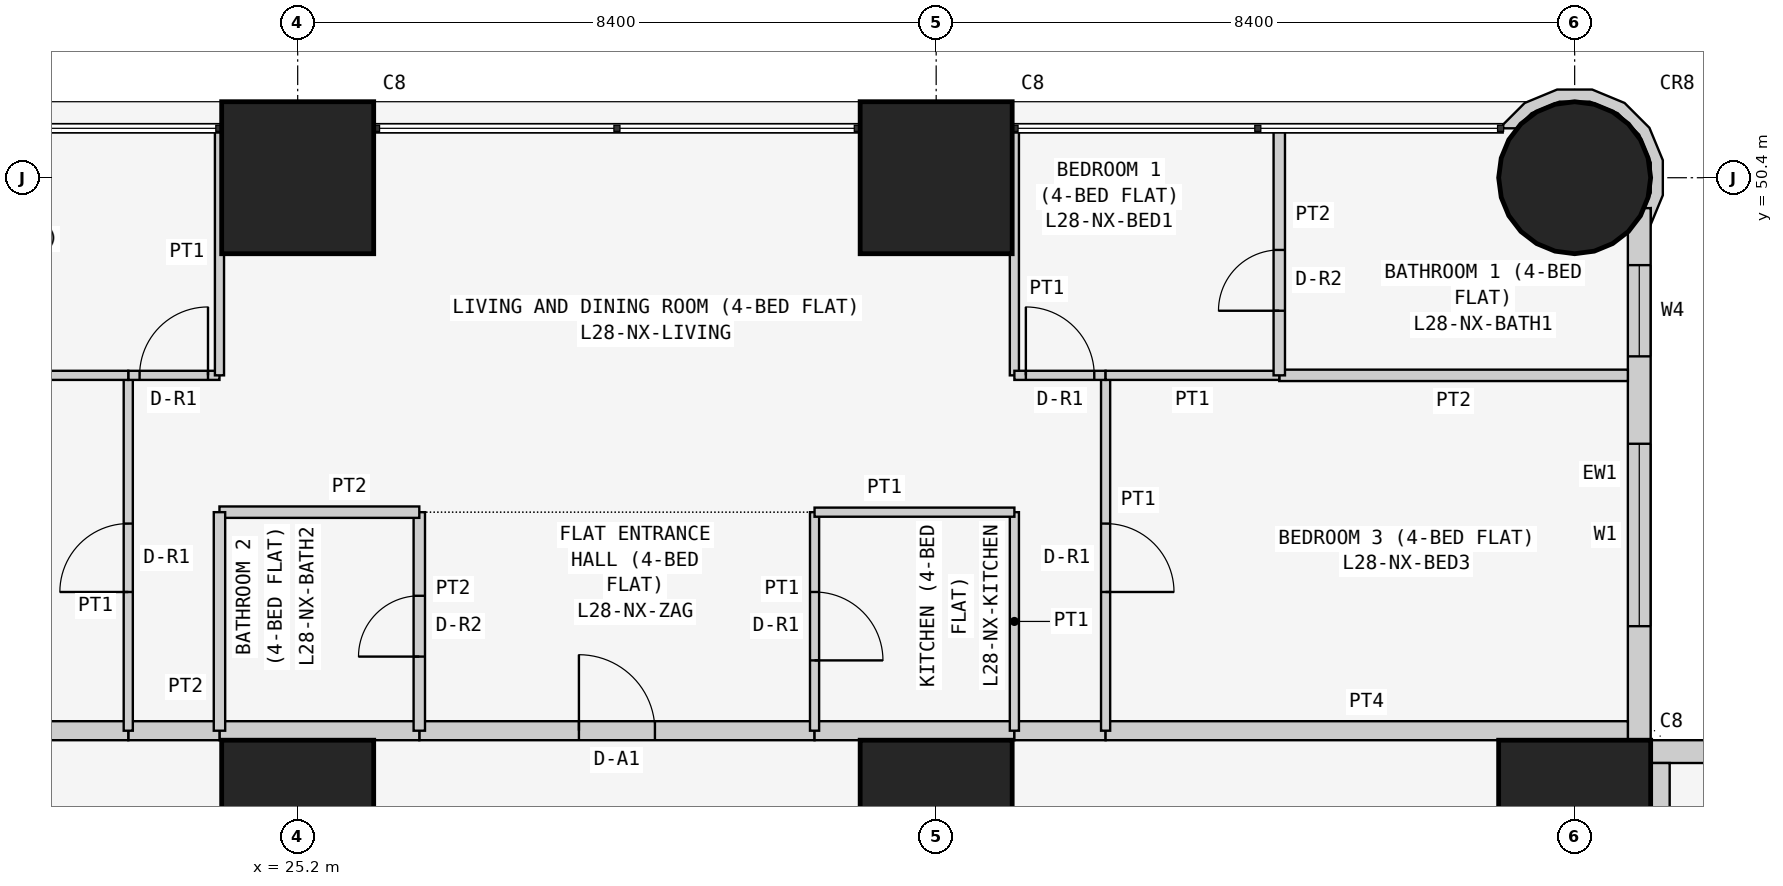
"""IFC4 building model, lengths in metres.
Left out: names, types, materials, properties, quantities, classifications, styles, units other than length and angle.
Written with IfcOpenShell. Run it as: python <this file> out.ifc"""

import sys

from ifc_helpers import new_model, si_unit, direction, frame, frame_2d, origin, origin_2d, place, context, subcontext, project, spatial, polyline, rectangle, circle, outline, extrude, element, fill, save


model = new_model("IFC4")
c1 = context("Model", 3, precision=1e-05, world=origin(), true_north=direction((0.0, 1.0)))
c2 = subcontext(c1, "Body", "Model", "MODEL_VIEW")
j1 = project(units=[si_unit("LENGTHUNIT", "METRE"), si_unit("PLANEANGLEUNIT", "RADIAN")], contexts=[c1])
p1 = place(None, origin())
s1 = spatial("IfcSite", under=j1, at=p1, CompositionType="ELEMENT")
p2 = place(p1, origin())
s2 = spatial("IfcBuilding", under=s1, at=p2, CompositionType="ELEMENT")
p3 = place(p2, frame((0.0, 0.0, 112.5)))
s3 = spatial("IfcBuildingStorey", under=s2, at=p3, CompositionType="ELEMENT", Elevation=112.5)
for number, where, z_axis, x_axis in (
    (1, (25.2, 42.0, 0.0), (0.0, 0.0, 1.0), (1.0, 0.0, 0.0)),
    (2, (25.2, 50.4, 0.0), (0.0, 0.0, 1.0), (1.0, 0.0, 0.0)),
    (3, (33.6, 42.0, 0.0), (0.0, 0.0, 1.0), (1.0, 0.0, 0.0)),
    (4, (33.6, 50.4, 0.0), (0.0, 0.0, 1.0), (1.0, 0.0, 0.0)),
    (5, (42.0, 42.0, 0.0), (0.0, 0.0, 1.0), (1.0, 0.0, 0.0)),
):
    element("IfcColumn", number, at=place(p3, frame(where, z_axis=z_axis, x_axis=x_axis)), inside=s3, PredefinedType="COLUMN", context=c2, shape_type="SweptSolid", body=[
        extrude(rectangle(XDim=2.0, YDim=2.0, at=origin_2d()), origin(), (0.0, 0.0, 1.0), 3.6),
    ])
p4 = place(p3, frame((42.0, 50.4, 0.0), z_axis=(0.0, 0.0, 1.0), x_axis=(1.0, 0.0, 0.0)))
e6 = element("IfcColumn", 6, at=p4, inside=s3, PredefinedType="COLUMN", context=c2, shape_type="SweptSolid", body=[
    extrude(circle(Radius=1.0, at=origin_2d()), origin(), (0.0, 0.0, 1.0), 3.6),
])
p5 = place(p3, frame((58.4, 42.85, 0.0), z_axis=(0.0, 0.0, 1.0), x_axis=(-1.0, 0.0, 0.0)))
e7 = element("IfcWall", 7, at=p5, inside=s3, PredefinedType="SOLIDWALL", context=c2, shape_type="SweptSolid", body=[
    extrude(rectangle(XDim=15.7, YDim=0.3, at=frame_2d((7.85, 0.0))), origin(), (0.0, 0.0, 1.0), 3.45),
])
p6 = place(p5, frame((12.4, 0.0, 0.9)))
e8 = element("IfcOpeningElement", 8, at=p6, cuts=e7, PredefinedType="OPENING", context=c2, shape_type="SweptSolid", body=[
    extrude(rectangle(XDim=1.8, YDim=1.5, at=frame_2d((0.9, 0.75))), frame((0.0, 0.16, 0.0), z_axis=(0.0, -1.0, 0.0), x_axis=(1.0, 0.0, 0.0)), (0.0, 0.0, 1.0), 0.32),
])
p7 = place(p5, frame((9.55, 0.0, 1.5)))
e9 = element("IfcOpeningElement", 9, at=p7, cuts=e7, PredefinedType="OPENING", context=c2, shape_type="SweptSolid", body=[
    extrude(rectangle(XDim=0.9, YDim=0.7, at=frame_2d((0.45, 0.35))), frame((0.0, 0.16, 0.0), z_axis=(0.0, -1.0, 0.0), x_axis=(1.0, 0.0, 0.0)), (0.0, 0.0, 1.0), 0.32),
])
p8 = place(p5, frame((5.1, 0.0, 0.9)))
e10 = element("IfcOpeningElement", 10, at=p8, cuts=e7, PredefinedType="OPENING", context=c2, shape_type="SweptSolid", body=[
    extrude(rectangle(XDim=1.8, YDim=1.5, at=frame_2d((0.9, 0.75))), frame((0.0, 0.16, 0.0), z_axis=(0.0, -1.0, 0.0), x_axis=(1.0, 0.0, 0.0)), (0.0, 0.0, 1.0), 0.32),
])
p9 = place(p5, frame((2.0, 0.0, 0.0)))
e11 = element("IfcOpeningElement", 11, at=p9, cuts=e7, PredefinedType="OPENING", context=c2, shape_type="SweptSolid", body=[
    extrude(rectangle(XDim=0.9, YDim=2.4, at=frame_2d((0.45, 1.2))), frame((0.0, 0.16, 0.0), z_axis=(0.0, -1.0, 0.0), x_axis=(1.0, 0.0, 0.0)), (0.0, 0.0, 1.0), 0.32),
])
p10 = place(p5, frame((0.7, 0.0, 0.9)))
e12 = element("IfcOpeningElement", 12, at=p10, cuts=e7, PredefinedType="OPENING", context=c2, shape_type="SweptSolid", body=[
    extrude(rectangle(XDim=1.2, YDim=1.5, at=frame_2d((0.6, 0.75))), frame((0.0, 0.16, 0.0), z_axis=(0.0, -1.0, 0.0), x_axis=(1.0, 0.0, 0.0)), (0.0, 0.0, 1.0), 0.32),
])
p11 = place(p3, frame((42.85, 43.0, 0.0), z_axis=(0.0, 0.0, 1.0), x_axis=(0.0, 1.0, 0.0)))
e13 = element("IfcWall", 13, at=p11, inside=s3, PredefinedType="SOLIDWALL", context=c2, shape_type="SweptSolid", body=[
    extrude(rectangle(XDim=7.0, YDim=0.3, at=frame_2d((3.5, 0.0))), origin(), (0.0, 0.0, 1.0), 3.45),
])
p12 = place(p11, frame((1.5, 0.0, 0.9)))
e14 = element("IfcOpeningElement", 14, at=p12, cuts=e13, PredefinedType="OPENING", context=c2, shape_type="SweptSolid", body=[
    extrude(rectangle(XDim=2.4, YDim=1.5, at=frame_2d((1.2, 0.75))), frame((0.0, 0.16, 0.0), z_axis=(0.0, -1.0, 0.0), x_axis=(1.0, 0.0, 0.0)), (0.0, 0.0, 1.0), 0.32),
])
p13 = place(p11, frame((5.05, 0.0, 0.9)))
e15 = element("IfcOpeningElement", 15, at=p13, cuts=e13, PredefinedType="OPENING", context=c2, shape_type="SweptSolid", body=[
    extrude(rectangle(XDim=1.2, YDim=1.5, at=frame_2d((0.6, 0.75))), frame((0.0, 0.16, 0.0), z_axis=(0.0, -1.0, 0.0), x_axis=(1.0, 0.0, 0.0)), (0.0, 0.0, 1.0), 0.32),
])
p14 = place(p3, frame((42.919, 49.833, 0.0), z_axis=(0.0, 0.0, 1.0), x_axis=(0.555974394895, 0.831199417842, 0.0)))
e16 = element("IfcWall", 16, at=p14, inside=s3, PredefinedType="SOLIDWALL", context=c2, shape_type="SweptSolid", body=[
    extrude(outline(polyline([(0.413, -0.013), (0.797, 0.243), (1.053, 0.627), (1.143, 1.08), (1.053, 1.532), (0.796, 1.916), (0.412, 2.172), (0.017, 2.25), (-0.023, 2.224), (0.075, 2.077), (0.35, 2.022), (0.682, 1.801), (0.903, 1.47), (0.981, 1.08), (0.904, 0.689), (0.682, 0.358), (0.351, 0.137), (0.126, 0.092), (0.184, 0.026), (0.003, -0.095), (0.413, -0.013)])), origin(), (0.0, 0.0, 1.0), 3.45),
])
p15 = place(p3, frame((26.8, 43.125, 0.0), z_axis=(0.0, 0.0, 1.0), x_axis=(1.0, 0.0, 0.0)))
e17 = element("IfcWall", 17, at=p15, inside=s3, PredefinedType="PARTITIONING", context=c2, shape_type="SweptSolid", body=[
    extrude(rectangle(XDim=5.2, YDim=0.25, at=frame_2d((2.6, 0.0))), origin(), (0.0, 0.0, 1.0), 3.45),
])
p16 = place(p15, frame((2.1, 0.0, 0.0)))
e18 = element("IfcOpeningElement", 18, at=p16, cuts=e17, PredefinedType="OPENING", context=c2, shape_type="SweptSolid", body=[
    extrude(rectangle(XDim=1.0, YDim=2.1, at=frame_2d((0.5, 1.05))), frame((0.0, 0.135, 0.0), z_axis=(0.0, -1.0, 0.0), x_axis=(1.0, 0.0, 0.0)), (0.0, 0.0, 1.0), 0.27),
])
p17 = place(p3, frame((24.171, 43.125, 0.0), z_axis=(0.0, 0.0, 1.0), x_axis=(1.0, 0.0, 0.0)))
e19 = element("IfcWall", 19, at=p17, inside=s3, PredefinedType="PARTITIONING", context=c2, shape_type="SweptSolid", body=[
    extrude(rectangle(XDim=2.629, YDim=0.25, at=frame_2d((1.314, 0.0))), origin(), (0.0, 0.0, 1.0), 3.45),
])
p18 = place(p3, frame((32.0, 43.125, 0.0), z_axis=(0.0, 0.0, 1.0), x_axis=(1.0, 0.0, 0.0)))
e20 = element("IfcWall", 20, at=p18, inside=s3, PredefinedType="PARTITIONING", context=c2, shape_type="SweptSolid", body=[
    extrude(rectangle(XDim=2.629, YDim=0.25, at=frame_2d((1.314, 0.0))), origin(), (0.0, 0.0, 1.0), 3.45),
])
p19 = place(p3, frame((22.971, 43.125, 0.0), z_axis=(0.0, 0.0, 1.0), x_axis=(1.0, 0.0, 0.0)))
e21 = element("IfcWall", 21, at=p19, inside=s3, PredefinedType="PARTITIONING", context=c2, shape_type="SweptSolid", body=[
    extrude(rectangle(XDim=1.2, YDim=0.25, at=frame_2d((0.6, 0.0))), origin(), (0.0, 0.0, 1.0), 3.45),
])
p20 = place(p3, frame((34.629, 43.125, 0.0), z_axis=(0.0, 0.0, 1.0), x_axis=(1.0, 0.0, 0.0)))
e22 = element("IfcWall", 22, at=p20, inside=s3, PredefinedType="PARTITIONING", context=c2, shape_type="SweptSolid", body=[
    extrude(rectangle(XDim=1.2, YDim=0.25, at=frame_2d((0.6, 0.0))), origin(), (0.0, 0.0, 1.0), 3.45),
])
for number, where, z_axis, x_axis in (
    (23, (16.1, 43.125, 0.0), (0.0, 0.0, 1.0), (1.0, 0.0, 0.0)),
    (24, (35.829, 43.125, 0.0), (0.0, 0.0, 1.0), (1.0, 0.0, 0.0)),
    (25, (43.125, 42.7, 0.0), (0.0, 0.0, 1.0), (0.0, -1.0, 0.0)),
):
    element("IfcWall", number, at=place(p3, frame(where, z_axis=z_axis, x_axis=x_axis)), inside=s3, PredefinedType="PARTITIONING", context=c2, shape_type="SweptSolid", body=[
        extrude(rectangle(XDim=6.871, YDim=0.25, at=frame_2d((3.436, 0.0))), origin(), (0.0, 0.0, 1.0), 3.45),
    ])
p21 = place(p3, frame((26.8, 46.0, 0.0), z_axis=(0.0, 0.0, 1.0), x_axis=(0.0, -1.0, 0.0)))
e26 = element("IfcWall", 26, at=p21, inside=s3, PredefinedType="PARTITIONING", context=c2, shape_type="SweptSolid", body=[
    extrude(rectangle(XDim=2.875, YDim=0.15, at=frame_2d((1.438, 0.0))), origin(), (0.0, 0.0, 1.0), 3.45),
])
p22 = place(p21, frame((1.1, 0.0, 0.0)))
e27 = element("IfcOpeningElement", 27, at=p22, cuts=e26, PredefinedType="OPENING", context=c2, shape_type="SweptSolid", body=[
    extrude(rectangle(XDim=0.8, YDim=2.1, at=frame_2d((0.4, 1.05))), frame((0.0, 0.085, 0.0), z_axis=(0.0, -1.0, 0.0), x_axis=(1.0, 0.0, 0.0)), (0.0, 0.0, 1.0), 0.17),
])
p23 = place(p3, frame((32.0, 43.125, 0.0), z_axis=(0.0, 0.0, 1.0), x_axis=(0.0, 1.0, 0.0)))
e28 = element("IfcWall", 28, at=p23, inside=s3, PredefinedType="PARTITIONING", context=c2, shape_type="SweptSolid", body=[
    extrude(rectangle(XDim=2.875, YDim=0.12, at=frame_2d((1.438, 0.0))), origin(), (0.0, 0.0, 1.0), 3.45),
])
p24 = place(p23, frame((0.925, 0.0, 0.0)))
e29 = element("IfcOpeningElement", 29, at=p24, cuts=e28, PredefinedType="OPENING", context=c2, shape_type="SweptSolid", body=[
    extrude(rectangle(XDim=0.9, YDim=2.1, at=frame_2d((0.45, 1.05))), frame((0.0, 0.07, 0.0), z_axis=(0.0, -1.0, 0.0), x_axis=(1.0, 0.0, 0.0)), (0.0, 0.0, 1.0), 0.14),
])
p25 = place(p3, frame((26.8, 46.0, 0.0), z_axis=(0.0, 0.0, 1.0), x_axis=(-1.0, 0.0, 0.0)))
e30 = element("IfcWall", 30, at=p25, inside=s3, PredefinedType="PARTITIONING", context=c2, shape_type="SweptSolid", body=[
    extrude(rectangle(XDim=2.629, YDim=0.15, at=frame_2d((1.314, 0.0))), origin(), (0.0, 0.0, 1.0), 3.45),
])
p26 = place(p3, frame((24.171, 46.0, 0.0), z_axis=(0.0, 0.0, 1.0), x_axis=(0.0, -1.0, 0.0)))
e31 = element("IfcWall", 31, at=p26, inside=s3, PredefinedType="PARTITIONING", context=c2, shape_type="SweptSolid", body=[
    extrude(rectangle(XDim=2.875, YDim=0.15, at=frame_2d((1.438, 0.0))), origin(), (0.0, 0.0, 1.0), 3.45),
])
p27 = place(p3, frame((34.629, 43.125, 0.0), z_axis=(0.0, 0.0, 1.0), x_axis=(0.0, 1.0, 0.0)))
e32 = element("IfcWall", 32, at=p27, inside=s3, PredefinedType="PARTITIONING", context=c2, shape_type="SweptSolid", body=[
    extrude(rectangle(XDim=2.875, YDim=0.12, at=frame_2d((1.438, 0.0))), origin(), (0.0, 0.0, 1.0), 3.45),
])
p28 = place(p3, frame((34.629, 46.0, 0.0), z_axis=(0.0, 0.0, 1.0), x_axis=(-1.0, 0.0, 0.0)))
e33 = element("IfcWall", 33, at=p28, inside=s3, PredefinedType="PARTITIONING", context=c2, shape_type="SweptSolid", body=[
    extrude(rectangle(XDim=2.629, YDim=0.12, at=frame_2d((1.314, 0.0))), origin(), (0.0, 0.0, 1.0), 3.45),
])
p29 = place(p3, frame((22.971, 43.125, 0.0), z_axis=(0.0, 0.0, 1.0), x_axis=(0.0, 1.0, 0.0)))
e34 = element("IfcWall", 34, at=p29, inside=s3, PredefinedType="PARTITIONING", context=c2, shape_type="SweptSolid", body=[
    extrude(rectangle(XDim=4.675, YDim=0.12, at=frame_2d((2.337, 0.0))), origin(), (0.0, 0.0, 1.0), 3.45),
])
p30 = place(p29, frame((1.825, 0.0, 0.0)))
e35 = element("IfcOpeningElement", 35, at=p30, cuts=e34, PredefinedType="OPENING", context=c2, shape_type="SweptSolid", body=[
    extrude(rectangle(XDim=0.9, YDim=2.1, at=frame_2d((0.45, 1.05))), frame((0.0, 0.07, 0.0), z_axis=(0.0, -1.0, 0.0), x_axis=(1.0, 0.0, 0.0)), (0.0, 0.0, 1.0), 0.14),
])
p31 = place(p3, frame((22.971, 47.8, 0.0), z_axis=(0.0, 0.0, 1.0), x_axis=(1.0, 0.0, 0.0)))
e36 = element("IfcWall", 36, at=p31, inside=s3, PredefinedType="PARTITIONING", context=c2, shape_type="SweptSolid", body=[
    extrude(rectangle(XDim=1.2, YDim=0.12, at=frame_2d((0.6, 0.0))), origin(), (0.0, 0.0, 1.0), 3.45),
])
p32 = place(p31, frame((0.149, 0.0, 0.0)))
e37 = element("IfcOpeningElement", 37, at=p32, cuts=e36, PredefinedType="OPENING", context=c2, shape_type="SweptSolid", body=[
    extrude(rectangle(XDim=0.9, YDim=2.1, at=frame_2d((0.45, 1.05))), frame((0.0, 0.07, 0.0), z_axis=(0.0, -1.0, 0.0), x_axis=(1.0, 0.0, 0.0)), (0.0, 0.0, 1.0), 0.14),
])
p33 = place(p3, frame((24.171, 47.8, 0.0), z_axis=(0.0, 0.0, 1.0), x_axis=(0.0, 1.0, 0.0)))
e38 = element("IfcWall", 38, at=p33, inside=s3, PredefinedType="PARTITIONING", context=c2, shape_type="SweptSolid", body=[
    extrude(rectangle(XDim=3.25, YDim=0.12, at=frame_2d((1.625, 0.0))), origin(), (0.0, 0.0, 1.0), 3.45),
])
p34 = place(p3, frame((35.829, 47.8, 0.0), z_axis=(0.0, 0.0, 1.0), x_axis=(0.0, -1.0, 0.0)))
e39 = element("IfcWall", 39, at=p34, inside=s3, PredefinedType="PARTITIONING", context=c2, shape_type="SweptSolid", body=[
    extrude(rectangle(XDim=4.675, YDim=0.12, at=frame_2d((2.337, 0.0))), origin(), (0.0, 0.0, 1.0), 3.45),
])
p35 = place(p34, frame((1.95, 0.0, 0.0)))
e40 = element("IfcOpeningElement", 40, at=p35, cuts=e39, PredefinedType="OPENING", context=c2, shape_type="SweptSolid", body=[
    extrude(rectangle(XDim=0.9, YDim=2.1, at=frame_2d((0.45, 1.05))), frame((0.0, 0.07, 0.0), z_axis=(0.0, -1.0, 0.0), x_axis=(1.0, 0.0, 0.0)), (0.0, 0.0, 1.0), 0.14),
])
p36 = place(p3, frame((34.629, 51.05, 0.0), z_axis=(0.0, 0.0, 1.0), x_axis=(0.0, -1.0, 0.0)))
e41 = element("IfcWall", 41, at=p36, inside=s3, PredefinedType="PARTITIONING", context=c2, shape_type="SweptSolid", body=[
    extrude(rectangle(XDim=3.25, YDim=0.12, at=frame_2d((1.625, 0.0))), origin(), (0.0, 0.0, 1.0), 3.45),
])
p37 = place(p3, frame((34.629, 47.8, 0.0), z_axis=(0.0, 0.0, 1.0), x_axis=(1.0, 0.0, 0.0)))
e42 = element("IfcWall", 42, at=p37, inside=s3, PredefinedType="PARTITIONING", context=c2, shape_type="SweptSolid", body=[
    extrude(rectangle(XDim=1.2, YDim=0.12, at=frame_2d((0.6, 0.0))), origin(), (0.0, 0.0, 1.0), 3.45),
])
p38 = place(p37, frame((0.151, 0.0, 0.0)))
e43 = element("IfcOpeningElement", 43, at=p38, cuts=e42, PredefinedType="OPENING", context=c2, shape_type="SweptSolid", body=[
    extrude(rectangle(XDim=0.9, YDim=2.1, at=frame_2d((0.45, 1.05))), frame((0.0, 0.07, 0.0), z_axis=(0.0, -1.0, 0.0), x_axis=(1.0, 0.0, 0.0)), (0.0, 0.0, 1.0), 0.14),
])
p39 = place(p3, frame((22.971, 47.8, 0.0), z_axis=(0.0, 0.0, 1.0), x_axis=(-1.0, 0.0, 0.0)))
e44 = element("IfcWall", 44, at=p39, inside=s3, PredefinedType="PARTITIONING", context=c2, shape_type="SweptSolid", body=[
    extrude(rectangle(XDim=6.871, YDim=0.12, at=frame_2d((3.436, 0.0))), origin(), (0.0, 0.0, 1.0), 3.45),
])
p40 = place(p3, frame((42.7, 47.8, 0.0), z_axis=(0.0, 0.0, 1.0), x_axis=(-1.0, 0.0, 0.0)))
e45 = element("IfcWall", 45, at=p40, inside=s3, PredefinedType="PARTITIONING", context=c2, shape_type="SweptSolid", body=[
    extrude(rectangle(XDim=4.586, YDim=0.15, at=frame_2d((2.293, 0.0))), origin(), (0.0, 0.0, 1.0), 3.45),
])
p41 = place(p3, frame((38.114, 47.8, 0.0), z_axis=(0.0, 0.0, 1.0), x_axis=(-1.0, 0.0, 0.0)))
e46 = element("IfcWall", 46, at=p41, inside=s3, PredefinedType="PARTITIONING", context=c2, shape_type="SweptSolid", body=[
    extrude(rectangle(XDim=2.285, YDim=0.12, at=frame_2d((1.143, 0.0))), origin(), (0.0, 0.0, 1.0), 3.45),
])
p42 = place(p3, frame((38.114, 51.05, 0.0), z_axis=(0.0, 0.0, 1.0), x_axis=(0.0, -1.0, 0.0)))
e47 = element("IfcWall", 47, at=p42, inside=s3, PredefinedType="PARTITIONING", context=c2, shape_type="SweptSolid", body=[
    extrude(rectangle(XDim=3.25, YDim=0.15, at=frame_2d((1.625, 0.0))), origin(), (0.0, 0.0, 1.0), 3.45),
])
p43 = place(p42, frame((1.6, 0.0, 0.0)))
e48 = element("IfcOpeningElement", 48, at=p43, cuts=e47, PredefinedType="OPENING", context=c2, shape_type="SweptSolid", body=[
    extrude(rectangle(XDim=0.8, YDim=2.1, at=frame_2d((0.4, 1.05))), frame((0.0, 0.085, 0.0), z_axis=(0.0, -1.0, 0.0), x_axis=(1.0, 0.0, 0.0)), (0.0, 0.0, 1.0), 0.17),
])
p44 = place(p12, origin())
e49 = element("IfcWindow", 49, at=p44, inside=s3, PartitioningType="SINGLE_PANEL", PredefinedType="WINDOW", context=c2, shape_type="SweptSolid", body=[
    extrude(rectangle(XDim=2.4, YDim=1.5, at=frame_2d((1.2, 0.75))), frame((0.0, 0.03, 0.0), z_axis=(0.0, -1.0, 0.0), x_axis=(1.0, 0.0, 0.0)), (0.0, 0.0, 1.0), 0.06),
])
fill(e14, e49)
p45 = place(p13, origin())
e50 = element("IfcWindow", 50, at=p45, inside=s3, PartitioningType="SINGLE_PANEL", PredefinedType="WINDOW", context=c2, shape_type="SweptSolid", body=[
    extrude(rectangle(XDim=1.2, YDim=1.5, at=frame_2d((0.6, 0.75))), frame((0.0, 0.03, 0.0), z_axis=(0.0, -1.0, 0.0), x_axis=(1.0, 0.0, 0.0)), (0.0, 0.0, 1.0), 0.06),
])
fill(e15, e50)
p46 = place(p16, origin())
e51 = element("IfcDoor", 51, at=p46, inside=s3, OperationType="SINGLE_SWING_LEFT", PredefinedType="DOOR", context=c2, shape_type="SweptSolid", body=[
    extrude(rectangle(XDim=1.0, YDim=2.1, at=frame_2d((0.5, 1.05))), frame((0.0, 0.025, 0.0), z_axis=(0.0, -1.0, 0.0), x_axis=(1.0, 0.0, 0.0)), (0.0, 0.0, 1.0), 0.05),
])
fill(e18, e51)
p47 = place(p22, frame((0.8, 0.0, 0.0), z_axis=(0.0, 0.0, 1.0), x_axis=(-1.0, 0.0, 0.0)))
e52 = element("IfcDoor", 52, at=p47, inside=s3, OperationType="SINGLE_SWING_LEFT", PredefinedType="DOOR", context=c2, shape_type="SweptSolid", body=[
    extrude(rectangle(XDim=0.8, YDim=2.1, at=frame_2d((0.4, 1.05))), frame((0.0, 0.025, 0.0), z_axis=(0.0, -1.0, 0.0), x_axis=(1.0, 0.0, 0.0)), (0.0, 0.0, 1.0), 0.05),
])
fill(e27, e52)
p48 = place(p24, frame((0.9, 0.0, 0.0), z_axis=(0.0, 0.0, 1.0), x_axis=(-1.0, 0.0, 0.0)))
e53 = element("IfcDoor", 53, at=p48, inside=s3, OperationType="SINGLE_SWING_RIGHT", PredefinedType="DOOR", context=c2, shape_type="SweptSolid", body=[
    extrude(rectangle(XDim=0.9, YDim=2.1, at=frame_2d((0.45, 1.05))), frame((0.0, 0.025, 0.0), z_axis=(0.0, -1.0, 0.0), x_axis=(1.0, 0.0, 0.0)), (0.0, 0.0, 1.0), 0.05),
])
fill(e29, e53)
p49 = place(p30, origin())
e54 = element("IfcDoor", 54, at=p49, inside=s3, OperationType="SINGLE_SWING_LEFT", PredefinedType="DOOR", context=c2, shape_type="SweptSolid", body=[
    extrude(rectangle(XDim=0.9, YDim=2.1, at=frame_2d((0.45, 1.05))), frame((0.0, 0.025, 0.0), z_axis=(0.0, -1.0, 0.0), x_axis=(1.0, 0.0, 0.0)), (0.0, 0.0, 1.0), 0.05),
])
fill(e35, e54)
p50 = place(p32, origin())
e55 = element("IfcDoor", 55, at=p50, inside=s3, OperationType="SINGLE_SWING_RIGHT", PredefinedType="DOOR", context=c2, shape_type="SweptSolid", body=[
    extrude(rectangle(XDim=0.9, YDim=2.1, at=frame_2d((0.45, 1.05))), frame((0.0, 0.025, 0.0), z_axis=(0.0, -1.0, 0.0), x_axis=(1.0, 0.0, 0.0)), (0.0, 0.0, 1.0), 0.05),
])
fill(e37, e55)
p51 = place(p35, origin())
e56 = element("IfcDoor", 56, at=p51, inside=s3, OperationType="SINGLE_SWING_RIGHT", PredefinedType="DOOR", context=c2, shape_type="SweptSolid", body=[
    extrude(rectangle(XDim=0.9, YDim=2.1, at=frame_2d((0.45, 1.05))), frame((0.0, 0.025, 0.0), z_axis=(0.0, -1.0, 0.0), x_axis=(1.0, 0.0, 0.0)), (0.0, 0.0, 1.0), 0.05),
])
fill(e40, e56)
p52 = place(p38, origin())
e57 = element("IfcDoor", 57, at=p52, inside=s3, OperationType="SINGLE_SWING_LEFT", PredefinedType="DOOR", context=c2, shape_type="SweptSolid", body=[
    extrude(rectangle(XDim=0.9, YDim=2.1, at=frame_2d((0.45, 1.05))), frame((0.0, 0.025, 0.0), z_axis=(0.0, -1.0, 0.0), x_axis=(1.0, 0.0, 0.0)), (0.0, 0.0, 1.0), 0.05),
])
fill(e43, e57)
p53 = place(p43, frame((0.8, 0.0, 0.0), z_axis=(0.0, 0.0, 1.0), x_axis=(-1.0, 0.0, 0.0)))
e58 = element("IfcDoor", 58, at=p53, inside=s3, OperationType="SINGLE_SWING_LEFT", PredefinedType="DOOR", context=c2, shape_type="SweptSolid", body=[
    extrude(rectangle(XDim=0.8, YDim=2.1, at=frame_2d((0.4, 1.05))), frame((0.0, 0.025, 0.0), z_axis=(0.0, -1.0, 0.0), x_axis=(1.0, 0.0, 0.0)), (0.0, 0.0, 1.0), 0.05),
])
fill(e48, e58)
save(model, sys.argv[1])
